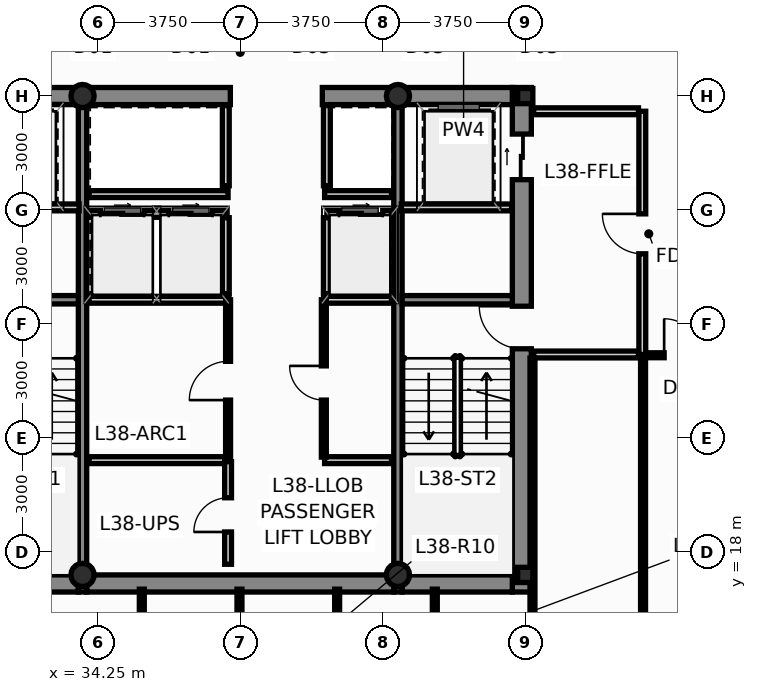
"""IFC4 building model, lengths in metres.
Left out: names, types, materials, properties, quantities, classifications, styles, units other than length and angle.
Written with IfcOpenShell. Run it as: python <this file> out.ifc"""

import sys

from ifc_helpers import new_model, si_unit, direction, frame, frame_2d, origin, origin_2d, place, context, subcontext, project, spatial, rectangle, hollow_circle, i_section, extrude, source, transform, mapped, element, fill, save


model = new_model("IFC4")
c1 = context("Model", 3, precision=1e-05, world=origin(), true_north=direction((0.0, 1.0)))
c2 = subcontext(c1, "Body", "Model", "MODEL_VIEW")
j1 = project(units=[si_unit("LENGTHUNIT", "METRE"), si_unit("PLANEANGLEUNIT", "RADIAN")], contexts=[c1])
p1 = place(None, origin())
s1 = spatial("IfcSite", under=j1, at=p1, CompositionType="ELEMENT")
p2 = place(p1, origin())
s2 = spatial("IfcBuilding", under=s1, at=p2, CompositionType="ELEMENT")
p3 = place(p2, frame((0.0, 0.0, 146.4)))
s3 = spatial("IfcBuildingStorey", under=s2, at=p3, CompositionType="ELEMENT", Elevation=146.4)
m1 = source(origin(), c2, "Body", "SweptSolid", [
    extrude(i_section(OverallWidth=0.4, OverallDepth=0.4, WebThickness=0.02, FlangeThickness=0.032, at=origin_2d()), origin(), (0.0, 0.0, 1.0), 3.65),
])
for number, where, z_axis, x_axis in (
    (1, (45.5, 17.4, 0.0), (0.0, 0.0, 1.0), (1.0, 0.0, 0.0)),
    (2, (45.5, 30.0, 0.0), (0.0, 0.0, 1.0), (1.0, 0.0, 0.0)),
):
    element("IfcColumn", number, at=place(p3, frame(where, z_axis=z_axis, x_axis=x_axis)), inside=s3, PredefinedType="COLUMN", context=c2, shape_type="MappedRepresentation", body=[
        mapped(m1, transform((0.0, 0.0, 0.0), scale=1.0)),
    ])
m2 = source(origin(), c2, "Body", "SweptSolid", [
    extrude(hollow_circle(Radius=0.305, WallThickness=0.025, at=origin_2d()), origin(), (0.0, 0.0, 1.0), 3.65),
])
for number, where, z_axis, x_axis in (
    (3, (33.85, 17.4, 0.0), (0.0, 0.0, 1.0), (1.0, 0.0, 0.0)),
    (4, (42.15, 17.4, 0.0), (0.0, 0.0, 1.0), (1.0, 0.0, 0.0)),
    (5, (33.85, 30.0, 0.0), (0.0, 0.0, 1.0), (1.0, 0.0, 0.0)),
    (6, (42.15, 30.0, 0.0), (0.0, 0.0, 1.0), (1.0, 0.0, 0.0)),
):
    element("IfcColumn", number, at=place(p3, frame(where, z_axis=z_axis, x_axis=x_axis)), inside=s3, PredefinedType="COLUMN", context=c2, shape_type="MappedRepresentation", body=[
        mapped(m2, transform((0.0, 0.0, 0.0), scale=1.0)),
    ])
p4 = place(p3, frame((45.41, 16.95, 0.0), z_axis=(0.0, 0.0, 1.0), x_axis=(0.0, 1.0, 0.0)))
e7 = element("IfcWall", 7, at=p4, inside=s3, PredefinedType="SHEAR", context=c2, shape_type="SweptSolid", body=[
    extrude(rectangle(XDim=13.275, YDim=0.5, at=frame_2d((6.638, 0.0))), origin(), (0.0, 0.0, 1.0), 3.65),
])
p5 = place(p4, frame((6.4, 0.0, 0.0)))
e8 = element("IfcOpeningElement", 8, at=p5, cuts=e7, PredefinedType="OPENING", context=c2, shape_type="SweptSolid", body=[
    extrude(rectangle(XDim=1.12, YDim=2.15, at=frame_2d((0.56, 1.075))), frame((0.0, 0.262, 0.0), z_axis=(0.0, -1.0, 0.0), x_axis=(1.0, 0.0, 0.0)), (0.0, 0.0, 1.0), 0.524),
])
p6 = place(p4, frame((10.85, 0.0, 0.0)))
e9 = element("IfcOpeningElement", 9, at=p6, cuts=e7, PredefinedType="OPENING", context=c2, shape_type="SweptSolid", body=[
    extrude(rectangle(XDim=1.2, YDim=2.2, at=frame_2d((0.6, 1.1))), frame((0.0, 0.262, 0.0), z_axis=(0.0, -1.0, 0.0), x_axis=(1.0, 0.0, 0.0)), (0.0, 0.0, 1.0), 0.524),
])
p7 = place(p3, frame((30.84, 17.175, 0.0), z_axis=(0.0, 0.0, 1.0), x_axis=(1.0, 0.0, 0.0)))
e10 = element("IfcWall", 10, at=p7, inside=s3, PredefinedType="SHEAR", context=c2, shape_type="SweptSolid", body=[
    extrude(rectangle(XDim=2.9, YDim=0.45, at=frame_2d((1.45, 0.0))), origin(), (0.0, 0.0, 1.0), 3.65),
])
p8 = place(p3, frame((33.96, 17.175, 0.0), z_axis=(0.0, 0.0, 1.0), x_axis=(1.0, 0.0, 0.0)))
e11 = element("IfcWall", 11, at=p8, inside=s3, PredefinedType="SHEAR", context=c2, shape_type="SweptSolid", body=[
    extrude(rectangle(XDim=8.08, YDim=0.45, at=frame_2d((4.04, 0.0))), origin(), (0.0, 0.0, 1.0), 3.65),
])
for number, where, z_axis, x_axis in (
    (12, (42.26, 17.175, 0.0), (0.0, 0.0, 1.0), (1.0, 0.0, 0.0)),
    (13, (30.84, 30.0, 0.0), (0.0, 0.0, 1.0), (1.0, 0.0, 0.0)),
):
    element("IfcWall", number, at=place(p3, frame(where, z_axis=z_axis, x_axis=x_axis)), inside=s3, PredefinedType="SHEAR", context=c2, shape_type="SweptSolid", body=[
        extrude(rectangle(XDim=2.9, YDim=0.45, at=frame_2d((1.45, 0.0))), origin(), (0.0, 0.0, 1.0), 3.65),
    ])
p9 = place(p3, frame((33.96, 30.0, 0.0), z_axis=(0.0, 0.0, 1.0), x_axis=(1.0, 0.0, 0.0)))
e14 = element("IfcWall", 14, at=p9, inside=s3, PredefinedType="SHEAR", context=c2, shape_type="SweptSolid", body=[
    extrude(rectangle(XDim=3.78, YDim=0.45, at=frame_2d((1.89, 0.0))), origin(), (0.0, 0.0, 1.0), 3.65),
])
p10 = place(p3, frame((40.16, 30.0, 0.0), z_axis=(0.0, 0.0, 1.0), x_axis=(1.0, 0.0, 0.0)))
e15 = element("IfcWall", 15, at=p10, inside=s3, PredefinedType="SHEAR", context=c2, shape_type="SweptSolid", body=[
    extrude(rectangle(XDim=1.88, YDim=0.45, at=frame_2d((0.94, 0.0))), origin(), (0.0, 0.0, 1.0), 3.65),
])
p11 = place(p3, frame((42.26, 30.0, 0.0), z_axis=(0.0, 0.0, 1.0), x_axis=(1.0, 0.0, 0.0)))
e16 = element("IfcWall", 16, at=p11, inside=s3, PredefinedType="SHEAR", context=c2, shape_type="SweptSolid", body=[
    extrude(rectangle(XDim=2.9, YDim=0.45, at=frame_2d((1.45, 0.0))), origin(), (0.0, 0.0, 1.0), 3.65),
])
for number, where, z_axis, x_axis in (
    (17, (33.85, 16.95, 0.0), (0.0, 0.0, 1.0), (0.0, 1.0, 0.0)),
    (18, (42.15, 16.95, 0.0), (0.0, 0.0, 1.0), (0.0, 1.0, 0.0)),
):
    element("IfcWall", number, at=place(p3, frame(where, z_axis=z_axis, x_axis=x_axis)), inside=s3, PredefinedType="SHEAR", context=c2, shape_type="SweptSolid", body=[
        extrude(rectangle(XDim=13.275, YDim=0.22, at=frame_2d((6.638, 0.0))), origin(), (0.0, 0.0, 1.0), 3.65),
    ])
for number, where, z_axis, x_axis in (
    (19, (30.84, 24.64, 0.0), (0.0, 0.0, 1.0), (1.0, 0.0, 0.0)),
    (20, (42.26, 24.64, 0.0), (0.0, 0.0, 1.0), (1.0, 0.0, 0.0)),
):
    element("IfcWall", number, at=place(p3, frame(where, z_axis=z_axis, x_axis=x_axis)), inside=s3, PredefinedType="SHEAR", context=c2, shape_type="SweptSolid", body=[
        extrude(rectangle(XDim=2.9, YDim=0.22, at=frame_2d((1.45, 0.0))), origin(), (0.0, 0.0, 1.0), 3.65),
    ])
p12 = place(p3, frame((34.02, 26.9, 0.0), z_axis=(0.0, 0.0, 1.0), x_axis=(1.0, 0.0, 0.0)))
e21 = element("IfcWall", 21, at=p12, inside=s3, PredefinedType="PARTITIONING", context=c2, shape_type="SweptSolid", body=[
    extrude(rectangle(XDim=3.6, YDim=0.18, at=frame_2d((1.8, 0.0))), origin(), (0.0, 0.0, 1.0), 3.25),
])
p13 = place(p12, frame((0.3, 0.0, 0.0)))
e22 = element("IfcOpeningElement", 22, at=p13, cuts=e21, PredefinedType="OPENING", context=c2, shape_type="SweptSolid", body=[
    extrude(rectangle(XDim=1.15, YDim=2.2, at=frame_2d((0.575, 1.1))), frame((0.0, 0.102, 0.0), z_axis=(0.0, -1.0, 0.0), x_axis=(1.0, 0.0, 0.0)), (0.0, 0.0, 1.0), 0.204),
])
p14 = place(p12, frame((2.1, 0.0, 0.0)))
e23 = element("IfcOpeningElement", 23, at=p14, cuts=e21, PredefinedType="OPENING", context=c2, shape_type="SweptSolid", body=[
    extrude(rectangle(XDim=1.15, YDim=2.2, at=frame_2d((0.575, 1.1))), frame((0.0, 0.102, 0.0), z_axis=(0.0, -1.0, 0.0), x_axis=(1.0, 0.0, 0.0)), (0.0, 0.0, 1.0), 0.204),
])
p15 = place(p3, frame((40.28, 26.9, 0.0), z_axis=(0.0, 0.0, 1.0), x_axis=(1.0, 0.0, 0.0)))
e24 = element("IfcWall", 24, at=p15, inside=s3, PredefinedType="PARTITIONING", context=c2, shape_type="SweptSolid", body=[
    extrude(rectangle(XDim=1.7, YDim=0.18, at=frame_2d((0.85, 0.0))), origin(), (0.0, 0.0, 1.0), 3.25),
])
p16 = place(p15, frame((0.32, 0.0, 0.0)))
e25 = element("IfcOpeningElement", 25, at=p16, cuts=e24, PredefinedType="OPENING", context=c2, shape_type="SweptSolid", body=[
    extrude(rectangle(XDim=1.15, YDim=2.2, at=frame_2d((0.575, 1.1))), frame((0.0, 0.102, 0.0), z_axis=(0.0, -1.0, 0.0), x_axis=(1.0, 0.0, 0.0)), (0.0, 0.0, 1.0), 0.204),
])
for number, where, z_axis, x_axis in (
    (26, (37.62, 24.8, 0.0), (0.0, 0.0, 1.0), (0.0, 1.0, 0.0)),
    (27, (40.28, 24.8, 0.0), (0.0, 0.0, 1.0), (0.0, 1.0, 0.0)),
):
    element("IfcWall", number, at=place(p3, frame(where, z_axis=z_axis, x_axis=x_axis)), inside=s3, PredefinedType="PARTITIONING", context=c2, shape_type="SweptSolid", body=[
        extrude(rectangle(XDim=2.0, YDim=0.18, at=frame_2d((1.0, 0.0))), origin(), (0.0, 0.0, 1.0), 3.25),
    ])
p17 = place(p3, frame((34.02, 24.64, 0.0), z_axis=(0.0, 0.0, 1.0), x_axis=(1.0, 0.0, 0.0)))
e28 = element("IfcWall", 28, at=p17, inside=s3, PredefinedType="PARTITIONING", context=c2, shape_type="SweptSolid", body=[
    extrude(rectangle(XDim=3.68, YDim=0.18, at=frame_2d((1.84, 0.0))), origin(), (0.0, 0.0, 1.0), 3.25),
])
p18 = place(p3, frame((40.2, 24.64, 0.0), z_axis=(0.0, 0.0, 1.0), x_axis=(1.0, 0.0, 0.0)))
e29 = element("IfcWall", 29, at=p18, inside=s3, PredefinedType="PARTITIONING", context=c2, shape_type="SweptSolid", body=[
    extrude(rectangle(XDim=1.78, YDim=0.18, at=frame_2d((0.89, 0.0))), origin(), (0.0, 0.0, 1.0), 3.25),
])
p19 = place(p3, frame((34.02, 27.42, 0.0), z_axis=(0.0, 0.0, 1.0), x_axis=(1.0, 0.0, 0.0)))
e30 = element("IfcWall", 30, at=p19, inside=s3, PredefinedType="PARTITIONING", context=c2, shape_type="SweptSolid", body=[
    extrude(rectangle(XDim=3.66, YDim=0.18, at=frame_2d((1.83, 0.0))), origin(), (0.0, 0.0, 1.0), 3.25),
])
p20 = place(p3, frame((40.22, 27.42, 0.0), z_axis=(0.0, 0.0, 1.0), x_axis=(1.0, 0.0, 0.0)))
e31 = element("IfcWall", 31, at=p20, inside=s3, PredefinedType="PARTITIONING", context=c2, shape_type="SweptSolid", body=[
    extrude(rectangle(XDim=1.76, YDim=0.18, at=frame_2d((0.88, 0.0))), origin(), (0.0, 0.0, 1.0), 3.25),
])
for number, where, z_axis, x_axis in (
    (32, (37.62, 27.64, 0.0), (0.0, 0.0, 1.0), (0.0, 1.0, 0.0)),
    (33, (40.28, 27.64, 0.0), (0.0, 0.0, 1.0), (0.0, 1.0, 0.0)),
):
    element("IfcWall", number, at=place(p3, frame(where, z_axis=z_axis, x_axis=x_axis)), inside=s3, PredefinedType="PARTITIONING", context=c2, shape_type="SweptSolid", body=[
        extrude(rectangle(XDim=2.11, YDim=0.18, at=frame_2d((1.055, 0.0))), origin(), (0.0, 0.0, 1.0), 3.25),
    ])
p21 = place(p3, frame((48.58, 23.2, 0.0), z_axis=(0.0, 0.0, 1.0), x_axis=(0.0, 1.0, 0.0)))
e34 = element("IfcWall", 34, at=p21, inside=s3, PredefinedType="PARTITIONING", context=c2, shape_type="SweptSolid", body=[
    extrude(rectangle(XDim=6.4, YDim=0.18, at=frame_2d((3.2, 0.0))), origin(), (0.0, 0.0, 1.0), 2.928),
])
p22 = place(p21, frame((2.65, 0.0, 0.0)))
e35 = element("IfcOpeningElement", 35, at=p22, cuts=e34, PredefinedType="OPENING", context=c2, shape_type="SweptSolid", body=[
    extrude(rectangle(XDim=1.05, YDim=2.15, at=frame_2d((0.525, 1.075))), frame((0.0, 0.102, 0.0), z_axis=(0.0, -1.0, 0.0), x_axis=(1.0, 0.0, 0.0)), (0.0, 0.0, 1.0), 0.204),
])
p23 = place(p3, frame((45.72, 23.2, 0.0), z_axis=(0.0, 0.0, 1.0), x_axis=(1.0, 0.0, 0.0)))
e36 = element("IfcWall", 36, at=p23, inside=s3, PredefinedType="PARTITIONING", context=c2, shape_type="SweptSolid", body=[
    extrude(rectangle(XDim=2.76, YDim=0.18, at=frame_2d((1.38, 0.0))), origin(), (0.0, 0.0, 1.0), 3.25),
])
p24 = place(p3, frame((45.72, 29.6, 0.0), z_axis=(0.0, 0.0, 1.0), x_axis=(1.0, 0.0, 0.0)))
e37 = element("IfcWall", 37, at=p24, inside=s3, PredefinedType="PARTITIONING", context=c2, shape_type="SweptSolid", body=[
    extrude(rectangle(XDim=2.76, YDim=0.18, at=frame_2d((1.38, 0.0))), origin(), (0.0, 0.0, 1.0), 2.775),
])
for number, where, z_axis, x_axis in (
    (38, (30.86, 27.07, 0.0), (0.0, 0.0, 1.0), (1.0, 0.0, 0.0)),
    (39, (42.24, 27.07, 0.0), (0.0, 0.0, 1.0), (1.0, 0.0, 0.0)),
):
    element("IfcWall", number, at=place(p3, frame(where, z_axis=z_axis, x_axis=x_axis)), inside=s3, PredefinedType="PARTITIONING", context=c2, shape_type="SweptSolid", body=[
        extrude(rectangle(XDim=2.9, YDim=0.18, at=frame_2d((1.45, 0.0))), origin(), (0.0, 0.0, 1.0), 3.25),
    ])
p25 = place(p3, frame((34.02, 20.42, 0.0), z_axis=(0.0, 0.0, 1.0), x_axis=(1.0, 0.0, 0.0)))
e40 = element("IfcWall", 40, at=p25, inside=s3, PredefinedType="PARTITIONING", context=c2, shape_type="SweptSolid", body=[
    extrude(rectangle(XDim=3.64, YDim=0.18, at=frame_2d((1.82, 0.0))), origin(), (0.0, 0.0, 1.0), 3.25),
])
p26 = place(p3, frame((40.22, 20.42, 0.0), z_axis=(0.0, 0.0, 1.0), x_axis=(1.0, 0.0, 0.0)))
e41 = element("IfcWall", 41, at=p26, inside=s3, PredefinedType="PARTITIONING", context=c2, shape_type="SweptSolid", body=[
    extrude(rectangle(XDim=1.76, YDim=0.18, at=frame_2d((0.88, 0.0))), origin(), (0.0, 0.0, 1.0), 3.25),
])
p27 = place(p3, frame((37.68, 20.5, 0.0), z_axis=(0.0, 0.0, 1.0), x_axis=(0.0, 1.0, 0.0)))
e42 = element("IfcWall", 42, at=p27, inside=s3, PredefinedType="PARTITIONING", context=c2, shape_type="SweptSolid", body=[
    extrude(rectangle(XDim=4.14, YDim=0.13, at=frame_2d((2.07, 0.0))), origin(), (0.0, 0.0, 1.0), 3.25),
])
p28 = place(p27, frame((1.5, 0.0, 0.0)))
e43 = element("IfcOpeningElement", 43, at=p28, cuts=e42, PredefinedType="OPENING", context=c2, shape_type="SweptSolid", body=[
    extrude(rectangle(XDim=1.02, YDim=2.15, at=frame_2d((0.51, 1.075))), frame((0.0, 0.077, 0.0), z_axis=(0.0, -1.0, 0.0), x_axis=(1.0, 0.0, 0.0)), (0.0, 0.0, 1.0), 0.154),
])
p29 = place(p3, frame((40.2, 20.5, 0.0), z_axis=(0.0, 0.0, 1.0), x_axis=(0.0, 1.0, 0.0)))
e44 = element("IfcWall", 44, at=p29, inside=s3, PredefinedType="PARTITIONING", context=c2, shape_type="SweptSolid", body=[
    extrude(rectangle(XDim=4.14, YDim=0.13, at=frame_2d((2.07, 0.0))), origin(), (0.0, 0.0, 1.0), 3.25),
])
p30 = place(p29, frame((1.5, 0.0, 0.0)))
e45 = element("IfcOpeningElement", 45, at=p30, cuts=e44, PredefinedType="OPENING", context=c2, shape_type="SweptSolid", body=[
    extrude(rectangle(XDim=0.9, YDim=2.1, at=frame_2d((0.45, 1.05))), frame((0.0, 0.077, 0.0), z_axis=(0.0, -1.0, 0.0), x_axis=(1.0, 0.0, 0.0)), (0.0, 0.0, 1.0), 0.154),
])
p31 = place(p3, frame((37.68, 17.68, 0.0), z_axis=(0.0, 0.0, 1.0), x_axis=(0.0, 1.0, 0.0)))
e46 = element("IfcWall", 46, at=p31, inside=s3, PredefinedType="PARTITIONING", context=c2, shape_type="SweptSolid", body=[
    extrude(rectangle(XDim=2.7, YDim=0.18, at=frame_2d((1.35, 0.0))), origin(), (0.0, 0.0, 1.0), 3.25),
])
p32 = place(p31, frame((0.85, 0.0, 0.0)))
e47 = element("IfcOpeningElement", 47, at=p32, cuts=e46, PredefinedType="OPENING", context=c2, shape_type="SweptSolid", body=[
    extrude(rectangle(XDim=0.9, YDim=2.1, at=frame_2d((0.45, 1.05))), frame((0.0, 0.102, 0.0), z_axis=(0.0, -1.0, 0.0), x_axis=(1.0, 0.0, 0.0)), (0.0, 0.0, 1.0), 0.204),
])
p33 = place(p3, frame((48.6, 6.315, 0.0), z_axis=(0.0, 0.0, 1.0), x_axis=(0.0, 1.0, 0.0)))
e48 = element("IfcWall", 48, at=p33, inside=s3, PredefinedType="PARTITIONING", context=c2, shape_type="SweptSolid", body=[
    extrude(rectangle(XDim=16.79, YDim=0.13, at=frame_2d((8.395, 0.0))), origin(), (0.0, 0.0, 1.0), 3.25),
])
p34 = place(p33, frame((7.963, 0.0, 0.0)))
e49 = element("IfcOpeningElement", 49, at=p34, cuts=e48, PredefinedType="OPENING", context=c2, shape_type="SweptSolid", body=[
    extrude(rectangle(XDim=0.96, YDim=2.15, at=frame_2d((0.48, 1.075))), frame((0.0, 0.077, 0.0), z_axis=(0.0, -1.0, 0.0), x_axis=(1.0, 0.0, 0.0)), (0.0, 0.0, 1.0), 0.154),
])
p35 = place(p3, frame((45.69, 6.339, 0.0), z_axis=(0.0, 0.0, 1.0), x_axis=(0.0, 1.0, 0.0)))
e50 = element("IfcWall", 50, at=p35, inside=s3, PredefinedType="PARTITIONING", context=c2, shape_type="SweptSolid", body=[
    extrude(rectangle(XDim=16.766, YDim=0.13, at=frame_2d((8.383, 0.0))), origin(), (0.0, 0.0, 1.0), 2.775),
])
p36 = place(p3, frame((43.12, 6.36, 0.0), z_axis=(0.0, 0.0, 1.0), x_axis=(0.0, 1.0, 0.0)))
e51 = element("IfcWall", 51, at=p36, inside=s3, PredefinedType="PARTITIONING", context=c2, shape_type="SweptSolid", body=[
    extrude(rectangle(XDim=10.665, YDim=0.13, at=frame_2d((5.333, 0.0))), origin(), (0.0, 0.0, 1.0), 2.775),
])
p37 = place(p36, frame((4.897, 0.0, 0.0)))
e52 = element("IfcOpeningElement", 52, at=p37, cuts=e51, PredefinedType="OPENING", context=c2, shape_type="SweptSolid", body=[
    extrude(rectangle(XDim=0.96, YDim=2.15, at=frame_2d((0.48, 1.075))), frame((0.0, 0.077, 0.0), z_axis=(0.0, -1.0, 0.0), x_axis=(1.0, 0.0, 0.0)), (0.0, 0.0, 1.0), 0.154),
])
p38 = place(p3, frame((40.55, 6.381, 0.0), z_axis=(0.0, 0.0, 1.0), x_axis=(0.0, 1.0, 0.0)))
e53 = element("IfcWall", 53, at=p38, inside=s3, PredefinedType="PARTITIONING", context=c2, shape_type="SweptSolid", body=[
    extrude(rectangle(XDim=10.644, YDim=0.13, at=frame_2d((5.322, 0.0))), origin(), (0.0, 0.0, 1.0), 3.25),
])
p39 = place(p38, frame((4.887, 0.0, 0.0)))
e54 = element("IfcOpeningElement", 54, at=p39, cuts=e53, PredefinedType="OPENING", context=c2, shape_type="SweptSolid", body=[
    extrude(rectangle(XDim=0.96, YDim=2.15, at=frame_2d((0.48, 1.075))), frame((0.0, 0.077, 0.0), z_axis=(0.0, -1.0, 0.0), x_axis=(1.0, 0.0, 0.0)), (0.0, 0.0, 1.0), 0.154),
])
p40 = place(p3, frame((37.98, 6.402, 0.0), z_axis=(0.0, 0.0, 1.0), x_axis=(0.0, 1.0, 0.0)))
e55 = element("IfcWall", 55, at=p40, inside=s3, PredefinedType="PARTITIONING", context=c2, shape_type="SweptSolid", body=[
    extrude(rectangle(XDim=10.623, YDim=0.13, at=frame_2d((5.311, 0.0))), origin(), (0.0, 0.0, 1.0), 3.25),
])
p41 = place(p40, frame((4.877, 0.0, 0.0)))
e56 = element("IfcOpeningElement", 56, at=p41, cuts=e55, PredefinedType="OPENING", context=c2, shape_type="SweptSolid", body=[
    extrude(rectangle(XDim=0.96, YDim=2.15, at=frame_2d((0.48, 1.075))), frame((0.0, 0.077, 0.0), z_axis=(0.0, -1.0, 0.0), x_axis=(1.0, 0.0, 0.0)), (0.0, 0.0, 1.0), 0.154),
])
p42 = place(p3, frame((35.41, 6.424, 0.0), z_axis=(0.0, 0.0, 1.0), x_axis=(0.0, 1.0, 0.0)))
e57 = element("IfcWall", 57, at=p42, inside=s3, PredefinedType="PARTITIONING", context=c2, shape_type="SweptSolid", body=[
    extrude(rectangle(XDim=10.601, YDim=0.13, at=frame_2d((5.301, 0.0))), origin(), (0.0, 0.0, 1.0), 3.25),
])
p43 = place(p42, frame((4.867, 0.0, 0.0)))
e58 = element("IfcOpeningElement", 58, at=p43, cuts=e57, PredefinedType="OPENING", context=c2, shape_type="SweptSolid", body=[
    extrude(rectangle(XDim=0.96, YDim=2.15, at=frame_2d((0.48, 1.075))), frame((0.0, 0.077, 0.0), z_axis=(0.0, -1.0, 0.0), x_axis=(1.0, 0.0, 0.0)), (0.0, 0.0, 1.0), 0.154),
])
p44 = place(p3, frame((48.675, 23.18, 0.0), z_axis=(0.0, 0.0, 1.0), x_axis=(1.0, 0.0, 0.0)))
e59 = element("IfcWall", 59, at=p44, inside=s3, PredefinedType="PARTITIONING", context=c2, shape_type="SweptSolid", body=[
    extrude(rectangle(XDim=1.92, YDim=0.13, at=frame_2d((0.96, 0.0))), origin(), (0.0, 0.0, 1.0), 3.25),
])
p45 = place(p44, frame((0.48, 0.0, 0.0)))
e60 = element("IfcOpeningElement", 60, at=p45, cuts=e59, PredefinedType="OPENING", context=c2, shape_type="SweptSolid", body=[
    extrude(rectangle(XDim=0.96, YDim=2.15, at=frame_2d((0.48, 1.075))), frame((0.0, 0.077, 0.0), z_axis=(0.0, -1.0, 0.0), x_axis=(1.0, 0.0, 0.0)), (0.0, 0.0, 1.0), 0.154),
])
p46 = place(p5, origin())
e61 = element("IfcDoor", 61, at=p46, inside=s3, OperationType="SINGLE_SWING_RIGHT", PredefinedType="DOOR", context=c2, shape_type="SweptSolid", body=[
    extrude(rectangle(XDim=1.12, YDim=2.15, at=frame_2d((0.56, 1.075))), frame((0.0, 0.025, 0.0), z_axis=(0.0, -1.0, 0.0), x_axis=(1.0, 0.0, 0.0)), (0.0, 0.0, 1.0), 0.05),
])
fill(e8, e61)
p47 = place(p6, origin())
e62 = element("IfcDoor", 62, at=p47, inside=s3, OperationType="SLIDING_TO_RIGHT", PredefinedType="DOOR", context=c2, shape_type="SweptSolid", body=[
    extrude(rectangle(XDim=1.2, YDim=2.2, at=frame_2d((0.6, 1.1))), frame((0.0, 0.025, 0.0), z_axis=(0.0, -1.0, 0.0), x_axis=(1.0, 0.0, 0.0)), (0.0, 0.0, 1.0), 0.05),
])
fill(e9, e62)
p48 = place(p13, origin())
e63 = element("IfcDoor", 63, at=p48, inside=s3, OperationType="SLIDING_TO_LEFT", PredefinedType="DOOR", context=c2, shape_type="SweptSolid", body=[
    extrude(rectangle(XDim=1.15, YDim=2.2, at=frame_2d((0.575, 1.1))), frame((0.0, 0.025, 0.0), z_axis=(0.0, -1.0, 0.0), x_axis=(1.0, 0.0, 0.0)), (0.0, 0.0, 1.0), 0.05),
])
fill(e22, e63)
p49 = place(p14, origin())
e64 = element("IfcDoor", 64, at=p49, inside=s3, OperationType="SLIDING_TO_RIGHT", PredefinedType="DOOR", context=c2, shape_type="SweptSolid", body=[
    extrude(rectangle(XDim=1.15, YDim=2.2, at=frame_2d((0.575, 1.1))), frame((0.0, 0.025, 0.0), z_axis=(0.0, -1.0, 0.0), x_axis=(1.0, 0.0, 0.0)), (0.0, 0.0, 1.0), 0.05),
])
fill(e23, e64)
p50 = place(p16, origin())
e65 = element("IfcDoor", 65, at=p50, inside=s3, OperationType="SLIDING_TO_LEFT", PredefinedType="DOOR", context=c2, shape_type="SweptSolid", body=[
    extrude(rectangle(XDim=1.15, YDim=2.2, at=frame_2d((0.575, 1.1))), frame((0.0, 0.025, 0.0), z_axis=(0.0, -1.0, 0.0), x_axis=(1.0, 0.0, 0.0)), (0.0, 0.0, 1.0), 0.05),
])
fill(e25, e65)
p51 = place(p22, origin())
e66 = element("IfcDoor", 66, at=p51, inside=s3, OperationType="SINGLE_SWING_RIGHT", PredefinedType="DOOR", context=c2, shape_type="SweptSolid", body=[
    extrude(rectangle(XDim=1.05, YDim=2.15, at=frame_2d((0.525, 1.075))), frame((0.0, 0.025, 0.0), z_axis=(0.0, -1.0, 0.0), x_axis=(1.0, 0.0, 0.0)), (0.0, 0.0, 1.0), 0.05),
])
fill(e35, e66)
p52 = place(p28, origin())
e67 = element("IfcDoor", 67, at=p52, inside=s3, OperationType="SINGLE_SWING_LEFT", PredefinedType="DOOR", context=c2, shape_type="SweptSolid", body=[
    extrude(rectangle(XDim=1.02, YDim=2.15, at=frame_2d((0.51, 1.075))), frame((0.0, 0.025, 0.0), z_axis=(0.0, -1.0, 0.0), x_axis=(1.0, 0.0, 0.0)), (0.0, 0.0, 1.0), 0.05),
])
fill(e43, e67)
p53 = place(p30, origin())
e68 = element("IfcDoor", 68, at=p53, inside=s3, OperationType="SINGLE_SWING_RIGHT", PredefinedType="DOOR", context=c2, shape_type="SweptSolid", body=[
    extrude(rectangle(XDim=0.9, YDim=2.1, at=frame_2d((0.45, 1.05))), frame((0.0, 0.025, 0.0), z_axis=(0.0, -1.0, 0.0), x_axis=(1.0, 0.0, 0.0)), (0.0, 0.0, 1.0), 0.05),
])
fill(e45, e68)
p54 = place(p32, origin())
e69 = element("IfcDoor", 69, at=p54, inside=s3, OperationType="SINGLE_SWING_LEFT", PredefinedType="DOOR", context=c2, shape_type="SweptSolid", body=[
    extrude(rectangle(XDim=0.9, YDim=2.1, at=frame_2d((0.45, 1.05))), frame((0.0, 0.025, 0.0), z_axis=(0.0, -1.0, 0.0), x_axis=(1.0, 0.0, 0.0)), (0.0, 0.0, 1.0), 0.05),
])
fill(e47, e69)
p55 = place(p45, origin())
e70 = element("IfcDoor", 70, at=p55, inside=s3, OperationType="SINGLE_SWING_LEFT", PredefinedType="DOOR", context=c2, shape_type="SweptSolid", body=[
    extrude(rectangle(XDim=0.96, YDim=2.15, at=frame_2d((0.48, 1.075))), frame((0.0, 0.025, 0.0), z_axis=(0.0, -1.0, 0.0), x_axis=(1.0, 0.0, 0.0)), (0.0, 0.0, 1.0), 0.05),
])
fill(e60, e70)
save(model, sys.argv[1])
